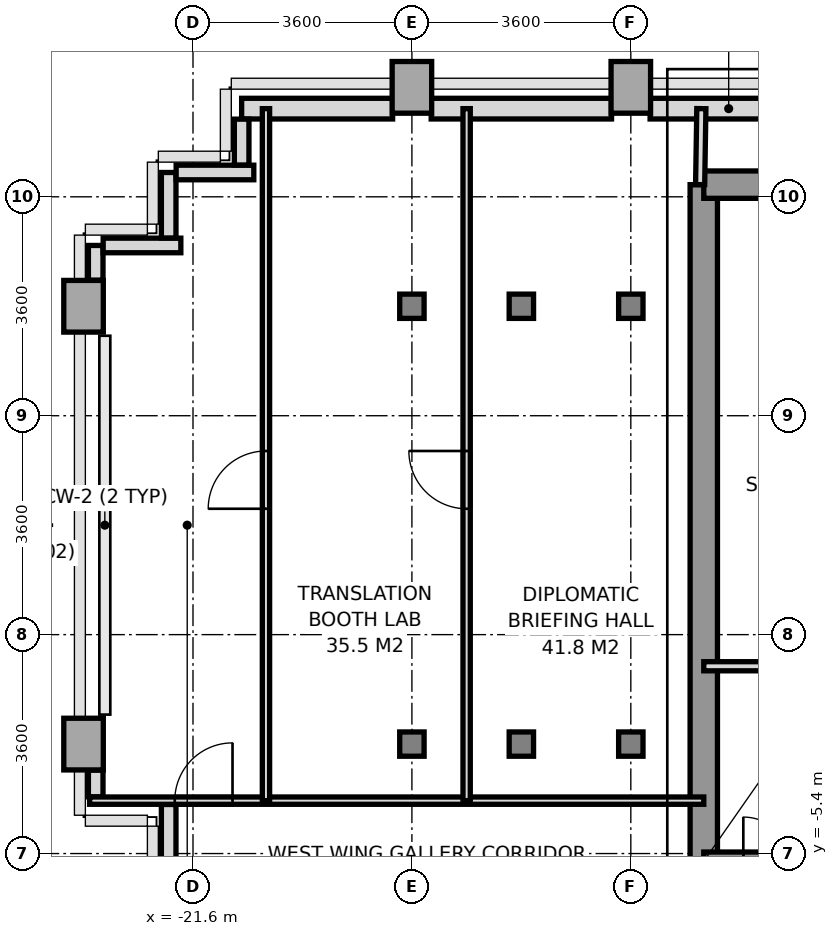
"""IFC4 building model, lengths in metres.
Left out: names, types, materials, properties, quantities, classifications, styles, units other than length and angle.
Written with IfcOpenShell. Run it as: python <this file> out.ifc"""

import sys

from ifc_helpers import new_model, si_unit, direction, frame, frame_2d, origin, origin_2d, place, context, subcontext, project, spatial, rectangle, i_section, extrude, source, transform, mapped, element, fill, save


model = new_model("IFC4")
c1 = context("Model", 3, precision=1e-05, world=origin(), true_north=direction((0.0, 1.0)))
c2 = subcontext(c1, "Body", "Model", "MODEL_VIEW")
j1 = project(units=[si_unit("LENGTHUNIT", "METRE"), si_unit("PLANEANGLEUNIT", "RADIAN")], contexts=[c1])
p1 = place(None, origin())
s1 = spatial("IfcSite", under=j1, at=p1, CompositionType="ELEMENT")
p2 = place(p1, origin())
s2 = spatial("IfcBuilding", under=s1, at=p2, CompositionType="ELEMENT")
p3 = place(p2, frame((0.0, 0.0, 117.6)))
s3 = spatial("IfcBuildingStorey", under=s2, at=p3, CompositionType="ELEMENT", Elevation=117.6)
m1 = source(origin(), c2, "Body", "SweptSolid", [
    extrude(rectangle(XDim=0.65, YDim=0.85, at=origin_2d()), origin(), (0.0, 0.0, 1.0), 3.2),
])
for number, where, z_axis, x_axis in (
    (1, (-23.4, -3.6, 0.0), (0.0, 0.0, 1.0), (1.0, 0.0, 0.0)),
    (2, (-23.4, 3.6, 0.0), (0.0, 0.0, 1.0), (1.0, 0.0, 0.0)),
):
    element("IfcColumn", number, at=place(p3, frame(where, z_axis=z_axis, x_axis=x_axis)), inside=s3, PredefinedType="COLUMN", context=c2, shape_type="MappedRepresentation", body=[
        mapped(m1, transform((0.0, 0.0, 0.0), x_axis=(1.0, 0.0, 0.0), y_axis=(0.0, 1.0, 0.0), z_axis=(0.0, 0.0, 1.0), scale=1.0)),
    ])
m2 = source(origin(), c2, "Body", "SweptSolid", [
    extrude(i_section(OverallWidth=0.401, OverallDepth=0.399, WebThickness=0.02, FlangeThickness=0.032, at=origin_2d()), origin(), (0.0, 0.0, 1.0), 3.2),
])
for number, where, z_axis, x_axis in (
    (3, (-18.0, -3.6, 0.0), (0.0, 0.0, 1.0), (1.0, 0.0, 0.0)),
    (4, (-18.0, 3.6, 0.0), (0.0, 0.0, 1.0), (1.0, 0.0, 0.0)),
):
    element("IfcColumn", number, at=place(p3, frame(where, z_axis=z_axis, x_axis=x_axis)), inside=s3, PredefinedType="COLUMN", context=c2, shape_type="MappedRepresentation", body=[
        mapped(m2, transform((0.0, 0.0, 0.0), x_axis=(1.0, 0.0, 0.0), y_axis=(0.0, 1.0, 0.0), z_axis=(0.0, 0.0, 1.0), scale=1.0)),
    ])
p4 = place(p3, frame((-18.0, 7.2, 0.0), z_axis=(0.0, 0.0, 1.0), x_axis=(1.0, 0.0, 0.0)))
e5 = element("IfcColumn", 5, at=p4, inside=s3, PredefinedType="COLUMN", context=c2, shape_type="MappedRepresentation", body=[
    mapped(m1, transform((0.0, 0.0, 0.0), x_axis=(1.0, 0.0, 0.0), y_axis=(0.0, 1.0, 0.0), z_axis=(0.0, 0.0, 1.0), scale=1.0)),
])
for number, where, z_axis, x_axis in (
    (6, (-16.2, -3.6, 0.0), (0.0, 0.0, 1.0), (1.0, 0.0, 0.0)),
    (7, (-16.2, 3.6, 0.0), (0.0, 0.0, 1.0), (1.0, 0.0, 0.0)),
    (8, (-14.4, -3.6, 0.0), (0.0, 0.0, 1.0), (1.0, 0.0, 0.0)),
    (9, (-14.4, 3.6, 0.0), (0.0, 0.0, 1.0), (1.0, 0.0, 0.0)),
):
    element("IfcColumn", number, at=place(p3, frame(where, z_axis=z_axis, x_axis=x_axis)), inside=s3, PredefinedType="COLUMN", context=c2, shape_type="MappedRepresentation", body=[
        mapped(m2, transform((0.0, 0.0, 0.0), x_axis=(1.0, 0.0, 0.0), y_axis=(0.0, 1.0, 0.0), z_axis=(0.0, 0.0, 1.0), scale=1.0)),
    ])
p5 = place(p3, frame((-14.4, 7.2, 0.0), z_axis=(0.0, 0.0, 1.0), x_axis=(1.0, 0.0, 0.0)))
e10 = element("IfcColumn", 10, at=p5, inside=s3, PredefinedType="COLUMN", context=c2, shape_type="MappedRepresentation", body=[
    mapped(m1, transform((0.0, 0.0, 0.0), x_axis=(1.0, 0.0, 0.0), y_axis=(0.0, 1.0, 0.0), z_axis=(0.0, 0.0, 1.0), scale=1.0)),
])
p6 = place(p3, frame((-20.8, 6.85, 0.0), z_axis=(0.0, 0.0, 1.0), x_axis=(1.0, 0.0, 0.0)))
e11 = element("IfcWall", 11, at=p6, inside=s3, PredefinedType="SOLIDWALL", context=c2, shape_type="SweptSolid", body=[
    extrude(rectangle(XDim=2.483, YDim=0.34, at=frame_2d((1.242, 0.0))), origin(), (0.0, 0.0, 1.0), 3.2),
])
p7 = place(p3, frame((-17.683, 6.85, 0.0), z_axis=(0.0, 0.0, 1.0), x_axis=(1.0, 0.0, 0.0)))
e12 = element("IfcWall", 12, at=p7, inside=s3, PredefinedType="SOLIDWALL", context=c2, shape_type="SweptSolid", body=[
    extrude(rectangle(XDim=2.966, YDim=0.34, at=frame_2d((1.483, 0.0))), origin(), (0.0, 0.0, 1.0), 2.45),
])
p8 = place(p3, frame((-14.083, 6.85, 0.0), z_axis=(0.0, 0.0, 1.0), x_axis=(1.0, 0.0, 0.0)))
e13 = element("IfcWall", 13, at=p8, inside=s3, PredefinedType="SOLIDWALL", context=c2, shape_type="SweptSolid", body=[
    extrude(rectangle(XDim=2.585, YDim=0.34, at=frame_2d((1.292, 0.0))), origin(), (0.0, 0.0, 1.0), 3.2),
])
p9 = place(p3, frame((-22.0, -5.677, 0.0), z_axis=(0.0, 0.0, 1.0), x_axis=(0.0, 1.0, 0.0)))
e14 = element("IfcWall", 14, at=p9, inside=s3, PredefinedType="PARAPET", context=c2, shape_type="SweptSolid", body=[
    extrude(rectangle(XDim=1.084, YDim=0.24, at=frame_2d((0.542, 0.0))), origin(), (0.0, 0.0, 1.0), 1.15),
])
p10 = place(p3, frame((-23.2, -4.467, 0.0), z_axis=(0.0, 0.0, 1.0), x_axis=(0.0, 1.0, 0.0)))
e15 = element("IfcWall", 15, at=p10, inside=s3, PredefinedType="PARAPET", context=c2, shape_type="SweptSolid", body=[
    extrude(rectangle(XDim=0.439, YDim=0.24, at=frame_2d((0.219, 0.0))), origin(), (0.0, 0.0, 1.0), 1.15),
])
p11 = place(p3, frame((-23.2, 4.028, 0.0), z_axis=(0.0, 0.0, 1.0), x_axis=(0.0, 1.0, 0.0)))
e16 = element("IfcWall", 16, at=p11, inside=s3, PredefinedType="PARAPET", context=c2, shape_type="SweptSolid", body=[
    extrude(rectangle(XDim=0.572, YDim=0.24, at=frame_2d((0.286, 0.0))), origin(), (0.0, 0.0, 1.0), 1.15),
])
p12 = place(p3, frame((-23.077, 4.6, 0.0), z_axis=(0.0, 0.0, 1.0), x_axis=(1.0, 0.0, 0.0)))
e17 = element("IfcWall", 17, at=p12, inside=s3, PredefinedType="PARAPET", context=c2, shape_type="SweptSolid", body=[
    extrude(rectangle(XDim=1.277, YDim=0.24, at=frame_2d((0.638, 0.0))), origin(), (0.0, 0.0, 1.0), 1.15),
])
p13 = place(p3, frame((-22.0, 4.723, 0.0), z_axis=(0.0, 0.0, 1.0), x_axis=(0.0, 1.0, 0.0)))
e18 = element("IfcWall", 18, at=p13, inside=s3, PredefinedType="PARAPET", context=c2, shape_type="SweptSolid", body=[
    extrude(rectangle(XDim=1.077, YDim=0.24, at=frame_2d((0.539, 0.0))), origin(), (0.0, 0.0, 1.0), 1.15),
])
p14 = place(p3, frame((-21.877, 5.8, 0.0), z_axis=(0.0, 0.0, 1.0), x_axis=(1.0, 0.0, 0.0)))
e19 = element("IfcWall", 19, at=p14, inside=s3, PredefinedType="PARAPET", context=c2, shape_type="SweptSolid", body=[
    extrude(rectangle(XDim=1.277, YDim=0.24, at=frame_2d((0.638, 0.0))), origin(), (0.0, 0.0, 1.0), 1.15),
])
p15 = place(p3, frame((-20.8, 5.923, 0.0), z_axis=(0.0, 0.0, 1.0), x_axis=(0.0, 1.0, 0.0)))
e20 = element("IfcWall", 20, at=p15, inside=s3, PredefinedType="PARAPET", context=c2, shape_type="SweptSolid", body=[
    extrude(rectangle(XDim=0.754, YDim=0.24, at=frame_2d((0.377, 0.0))), origin(), (0.0, 0.0, 1.0), 1.15),
])
p16 = place(p3, frame((-13.2, -5.6, 0.0), z_axis=(0.0, 0.0, 1.0), x_axis=(0.0, 1.0, 0.0)))
e21 = element("IfcWall", 21, at=p16, inside=s3, PredefinedType="SHEAR", context=c2, shape_type="SweptSolid", body=[
    extrude(rectangle(XDim=11.2, YDim=0.45, at=frame_2d((5.6, 0.0))), origin(), (0.0, 0.0, 1.0), 3.2),
])
p17 = place(p3, frame((-13.2, 5.6, 0.0), z_axis=(0.0, 0.0, 1.0), x_axis=(1.0, 0.0, 0.0)))
e22 = element("IfcWall", 22, at=p17, inside=s3, PredefinedType="SHEAR", context=c2, shape_type="SweptSolid", body=[
    extrude(rectangle(XDim=1.819, YDim=0.45, at=frame_2d((0.909, 0.0))), origin(), (0.0, 0.0, 1.0), 3.2),
])
p18 = place(p3, frame((-13.2, -5.6, 0.0), z_axis=(0.0, 0.0, 1.0), x_axis=(1.0, 0.0, 0.0)))
e23 = element("IfcWall", 23, at=p18, inside=s3, PredefinedType="SHEAR", context=c2, shape_type="SweptSolid", body=[
    extrude(rectangle(XDim=7.8, YDim=0.45, at=frame_2d((3.9, 0.0))), origin(), (0.0, 0.0, 1.0), 3.2),
])
p19 = place(p18, frame((3.6, 0.0, 0.0)))
e24 = element("IfcOpeningElement", 24, at=p19, cuts=e23, PredefinedType="OPENING", context=c2, shape_type="SweptSolid", body=[
    extrude(rectangle(XDim=1.2, YDim=2.2, at=frame_2d((0.6, 1.1))), frame((0.0, 0.235, 0.0), z_axis=(0.0, -1.0, 0.0), x_axis=(1.0, 0.0, 0.0)), (0.0, 0.0, 1.0), 0.47),
])
p20 = place(p18, frame((0.65, 0.0, 0.0)))
e25 = element("IfcOpeningElement", 25, at=p20, cuts=e23, PredefinedType="OPENING", context=c2, shape_type="SweptSolid", body=[
    extrude(rectangle(XDim=0.8, YDim=2.1, at=frame_2d((0.4, 1.05))), frame((0.0, 0.235, 0.0), z_axis=(0.0, -1.0, 0.0), x_axis=(1.0, 0.0, 0.0)), (0.0, 0.0, 1.0), 0.47),
])
p21 = place(p3, frame((-13.2, -2.32, 0.0), z_axis=(0.0, 0.0, 1.0), x_axis=(1.0, 0.0, 0.0)))
e26 = element("IfcWall", 26, at=p21, inside=s3, PredefinedType="PARTITIONING", context=c2, shape_type="SweptSolid", body=[
    extrude(rectangle(XDim=2.18, YDim=0.15, at=frame_2d((1.09, 0.0))), origin(), (0.0, 0.0, 1.0), 3.2),
])
p22 = place(p3, frame((-13.26, 5.6, 0.0), z_axis=(0.0, 0.0, 1.0), x_axis=(0.016013571389, 0.999871774545, 0.0)))
e27 = element("IfcWall", 27, at=p22, inside=s3, PredefinedType="PARTITIONING", context=c2, shape_type="SweptSolid", body=[
    extrude(rectangle(XDim=1.25, YDim=0.15, at=frame_2d((0.625, 0.0))), origin(), (0.0, 0.0, 1.0), 3.2),
])
p23 = place(p3, frame((-23.3, -4.53, 0.0), z_axis=(0.0, 0.0, 1.0), x_axis=(1.0, 0.0, 0.0)))
e28 = element("IfcWall", 28, at=p23, inside=s3, PredefinedType="PARTITIONING", context=c2, shape_type="SweptSolid", body=[
    extrude(rectangle(XDim=10.1, YDim=0.12, at=frame_2d((5.05, 0.0))), origin(), (0.0, 0.0, 1.0), 2.76),
])
p24 = place(p23, frame((1.4, 0.0, 0.0)))
e29 = element("IfcOpeningElement", 29, at=p24, cuts=e28, PredefinedType="OPENING", context=c2, shape_type="SweptSolid", body=[
    extrude(rectangle(XDim=0.95, YDim=2.15, at=frame_2d((0.475, 1.075))), frame((0.0, 0.07, 0.0), z_axis=(0.0, -1.0, 0.0), x_axis=(1.0, 0.0, 0.0)), (0.0, 0.0, 1.0), 0.14),
])
p25 = place(p3, frame((-20.4, -4.53, 0.0), z_axis=(0.0, 0.0, 1.0), x_axis=(0.0, 1.0, 0.0)))
e30 = element("IfcWall", 30, at=p25, inside=s3, PredefinedType="PARTITIONING", context=c2, shape_type="SweptSolid", body=[
    extrude(rectangle(XDim=11.38, YDim=0.12, at=frame_2d((5.69, 0.0))), origin(), (0.0, 0.0, 1.0), 2.7),
])
p26 = place(p25, frame((4.8, 0.0, 0.0)))
e31 = element("IfcOpeningElement", 31, at=p26, cuts=e30, PredefinedType="OPENING", context=c2, shape_type="SweptSolid", body=[
    extrude(rectangle(XDim=0.95, YDim=2.15, at=frame_2d((0.475, 1.075))), frame((0.0, 0.07, 0.0), z_axis=(0.0, -1.0, 0.0), x_axis=(1.0, 0.0, 0.0)), (0.0, 0.0, 1.0), 0.14),
])
p27 = place(p3, frame((-17.1, -4.53, 0.0), z_axis=(0.0, 0.0, 1.0), x_axis=(0.0, 1.0, 0.0)))
e32 = element("IfcWall", 32, at=p27, inside=s3, PredefinedType="PARTITIONING", context=c2, shape_type="SweptSolid", body=[
    extrude(rectangle(XDim=11.38, YDim=0.12, at=frame_2d((5.69, 0.0))), origin(), (0.0, 0.0, 1.0), 2.7),
])
p28 = place(p27, frame((4.8, 0.0, 0.0)))
e33 = element("IfcOpeningElement", 33, at=p28, cuts=e32, PredefinedType="OPENING", context=c2, shape_type="SweptSolid", body=[
    extrude(rectangle(XDim=0.95, YDim=2.15, at=frame_2d((0.475, 1.075))), frame((0.0, 0.07, 0.0), z_axis=(0.0, -1.0, 0.0), x_axis=(1.0, 0.0, 0.0)), (0.0, 0.0, 1.0), 0.14),
])
m3 = source(origin(), c2, "Body", "SweptSolid", [
    extrude(rectangle(XDim=0.95, YDim=2.15, at=frame_2d((0.475, 1.075))), frame((0.0, 0.025, 0.0), z_axis=(0.0, -1.0, 0.0), x_axis=(1.0, 0.0, 0.0)), (0.0, 0.0, 1.0), 0.05),
])
p29 = place(p24, origin())
e34 = element("IfcDoor", 34, at=p29, inside=s3, OperationType="SINGLE_SWING_RIGHT", PredefinedType="DOOR", context=c2, shape_type="MappedRepresentation", body=[
    mapped(m3, transform((0.0, 0.0, 0.0), x_axis=(1.0, 0.0, 0.0), y_axis=(0.0, 1.0, 0.0), z_axis=(0.0, 0.0, 1.0), scale=1.0)),
])
fill(e29, e34)
p30 = place(p26, origin())
e35 = element("IfcDoor", 35, at=p30, inside=s3, OperationType="SINGLE_SWING_LEFT", PredefinedType="DOOR", context=c2, shape_type="MappedRepresentation", body=[
    mapped(m3, transform((0.0, 0.0, 0.0), x_axis=(1.0, 0.0, 0.0), y_axis=(0.0, 1.0, 0.0), z_axis=(0.0, 0.0, 1.0), scale=1.0)),
])
fill(e31, e35)
p31 = place(p28, origin())
e36 = element("IfcDoor", 36, at=p31, inside=s3, OperationType="SINGLE_SWING_RIGHT", PredefinedType="DOOR", context=c2, shape_type="MappedRepresentation", body=[
    mapped(m3, transform((0.0, 0.0, 0.0), x_axis=(1.0, 0.0, 0.0), y_axis=(0.0, 1.0, 0.0), z_axis=(0.0, 0.0, 1.0), scale=1.0)),
])
fill(e33, e36)
save(model, sys.argv[1])
